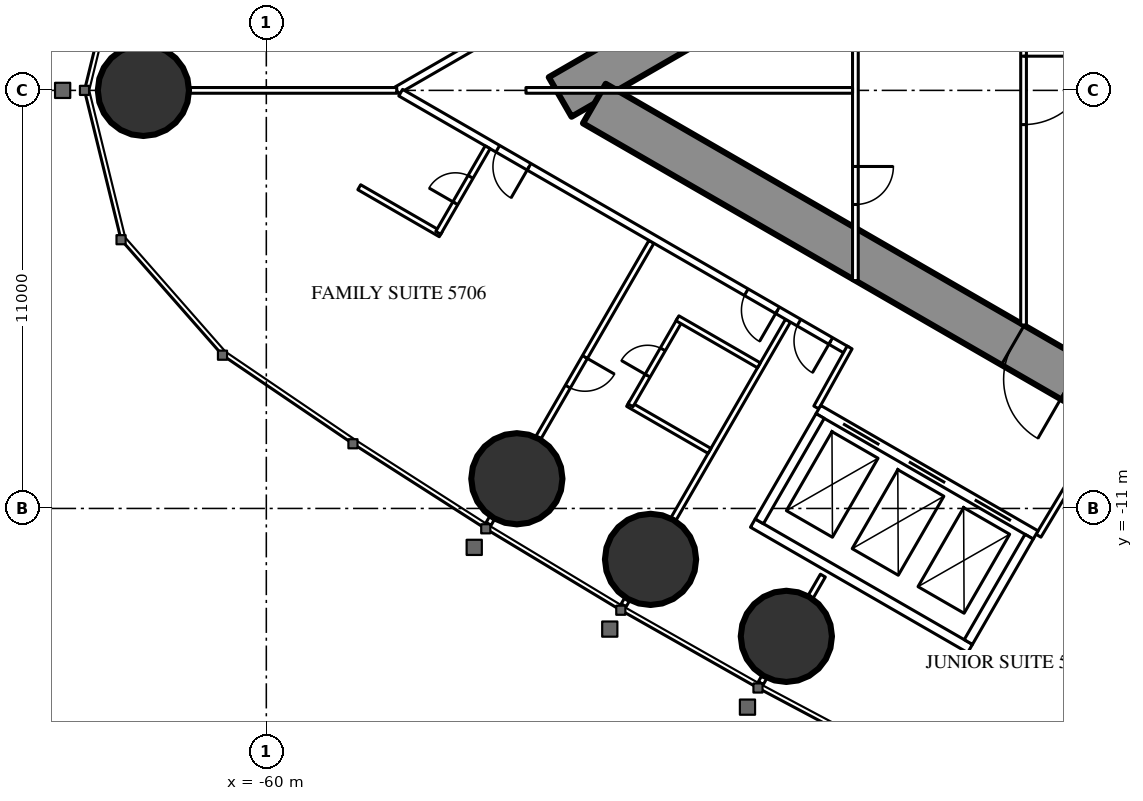
"""IFC4 building model, lengths in metres.
Left out: names, types, materials, properties, quantities, classifications, styles, units other than length and angle.
Written with IfcOpenShell. Run it as: python <this file> out.ifc"""

import sys

from ifc_helpers import new_model, si_unit, direction, frame, frame_2d, origin, origin_2d, place, context, subcontext, project, spatial, rectangle, circle, extrude, element, fill, save


model = new_model("IFC4")
c1 = context("Model", 3, precision=1e-05, world=origin(), true_north=direction((0.0, 1.0)))
c2 = subcontext(c1, "Body", "Model", "MODEL_VIEW")
j1 = project(units=[si_unit("LENGTHUNIT", "METRE"), si_unit("PLANEANGLEUNIT", "RADIAN")], contexts=[c1])
p1 = place(None, origin())
s1 = spatial("IfcSite", under=j1, at=p1, CompositionType="ELEMENT")
p2 = place(p1, origin())
s2 = spatial("IfcBuilding", under=s1, at=p2, CompositionType="ELEMENT")
p3 = place(p2, frame((0.0, 0.0, 215.3)))
s3 = spatial("IfcBuildingStorey", under=s2, at=p3, CompositionType="ELEMENT", Elevation=215.3)
for number, where, z_axis, x_axis in (
    (1, (-63.234, 0.0, 0.0), (0.0, 0.0, 1.0), (1.0, 0.0, 0.0)),
    (2, (-53.408, -10.219, 0.0), (0.0, 0.0, 1.0), (1.0, 0.0, 0.0)),
    (3, (-49.89, -12.34, 0.0), (0.0, 0.0, 1.0), (1.0, 0.0, 0.0)),
    (4, (-46.317, -14.365, 0.0), (0.0, 0.0, 1.0), (1.0, 0.0, 0.0)),
):
    element("IfcColumn", number, at=place(p3, frame(where, z_axis=z_axis, x_axis=x_axis)), inside=s3, PredefinedType="COLUMN", context=c2, shape_type="SweptSolid", body=[
        extrude(circle(Radius=1.2, at=origin_2d()), origin(), (0.0, 0.0, 1.0), 3.6),
    ])
p4 = place(p3, frame((-27.2, 14.3, 0.0), z_axis=(0.0, 0.0, 1.0), x_axis=(-0.866026593062, -0.499997940104, 0.0)))
e5 = element("IfcWall", 5, at=p4, inside=s3, PredefinedType="SHEAR", context=c2, shape_type="SweptSolid", body=[
    extrude(rectangle(XDim=28.946, YDim=1.2, at=frame_2d((14.473, 0.0))), origin(), (0.0, 0.0, 1.0), 3.6),
])
p5 = place(p4, frame((4.6, 0.0, 0.0)))
e6 = element("IfcOpeningElement", 6, at=p5, cuts=e5, PredefinedType="OPENING", context=c2, shape_type="SweptSolid", body=[
    extrude(rectangle(XDim=1.0, YDim=2.2, at=frame_2d((0.5, 1.1))), frame((0.0, 0.61, 0.0), z_axis=(0.0, -1.0, 0.0), x_axis=(1.0, 0.0, 0.0)), (0.0, 0.0, 1.0), 1.22),
])
p6 = place(p4, frame((13.395, 0.0, 0.0)))
e7 = element("IfcOpeningElement", 7, at=p6, cuts=e5, PredefinedType="OPENING", context=c2, shape_type="SweptSolid", body=[
    extrude(rectangle(XDim=1.8, YDim=2.2, at=frame_2d((0.9, 1.1))), frame((0.0, 0.61, 0.0), z_axis=(0.0, -1.0, 0.0), x_axis=(1.0, 0.0, 0.0)), (0.0, 0.0, 1.0), 1.22),
])
p7 = place(p3, frame((-27.2, -14.3, 0.0), z_axis=(0.0, 0.0, 1.0), x_axis=(-0.866024021859, 0.500002393557, 0.0)))
e8 = element("IfcWall", 8, at=p7, inside=s3, PredefinedType="SHEAR", context=c2, shape_type="SweptSolid", body=[
    extrude(rectangle(XDim=27.907, YDim=1.2, at=frame_2d((13.954, 0.0))), origin(), (0.0, 0.0, 1.0), 3.6),
])
p8 = place(p7, frame((4.6, 0.0, 0.0)))
e9 = element("IfcOpeningElement", 9, at=p8, cuts=e8, PredefinedType="OPENING", context=c2, shape_type="SweptSolid", body=[
    extrude(rectangle(XDim=1.0, YDim=2.2, at=frame_2d((0.5, 1.1))), frame((0.0, 0.61, 0.0), z_axis=(0.0, -1.0, 0.0), x_axis=(1.0, 0.0, 0.0)), (0.0, 0.0, 1.0), 1.22),
])
p9 = place(p7, frame((13.395, 0.0, 0.0)))
e10 = element("IfcOpeningElement", 10, at=p9, cuts=e8, PredefinedType="OPENING", context=c2, shape_type="SweptSolid", body=[
    extrude(rectangle(XDim=1.8, YDim=2.2, at=frame_2d((0.9, 1.1))), frame((0.0, 0.61, 0.0), z_axis=(0.0, -1.0, 0.0), x_axis=(1.0, 0.0, 0.0)), (0.0, 0.0, 1.0), 1.22),
])
p10 = place(p3, frame((-28.737, 16.068, 0.0), z_axis=(0.0, 0.0, 1.0), x_axis=(-0.866026057212, -0.499998868229, 0.0)))
e11 = element("IfcWall", 11, at=p10, inside=s3, PredefinedType="PARTITIONING", context=c2, shape_type="SweptSolid", body=[
    extrude(rectangle(XDim=32.137, YDim=0.2, at=frame_2d((16.068, 0.0))), origin(), (0.0, 0.0, 1.0), 3.35),
])
p11 = place(p10, frame((1.08, 0.0, 0.0)))
e12 = element("IfcOpeningElement", 12, at=p11, cuts=e11, PredefinedType="OPENING", context=c2, shape_type="SweptSolid", body=[
    extrude(rectangle(XDim=1.8, YDim=2.03, at=frame_2d((0.9, 1.015))), frame((0.0, 0.11, 0.0), z_axis=(0.0, -1.0, 0.0), x_axis=(1.0, 0.0, 0.0)), (0.0, 0.0, 1.0), 0.22),
])
p12 = place(p10, frame((6.86, 0.0, 0.0)))
e13 = element("IfcOpeningElement", 13, at=p12, cuts=e11, PredefinedType="OPENING", context=c2, shape_type="SweptSolid", body=[
    extrude(rectangle(XDim=1.0, YDim=2.2, at=frame_2d((0.5, 1.1))), frame((0.0, 0.11, 0.0), z_axis=(0.0, -1.0, 0.0), x_axis=(1.0, 0.0, 0.0)), (0.0, 0.0, 1.0), 0.22),
])
p13 = place(p10, frame((16.418, 0.0, 0.0)))
e14 = element("IfcOpeningElement", 14, at=p13, cuts=e11, PredefinedType="OPENING", context=c2, shape_type="SweptSolid", body=[
    extrude(rectangle(XDim=0.95, YDim=2.2, at=frame_2d((0.475, 1.1))), frame((0.0, 0.11, 0.0), z_axis=(0.0, -1.0, 0.0), x_axis=(1.0, 0.0, 0.0)), (0.0, 0.0, 1.0), 0.22),
])
p14 = place(p10, frame((20.567, 0.0, 0.0)))
e15 = element("IfcOpeningElement", 15, at=p14, cuts=e11, PredefinedType="OPENING", context=c2, shape_type="SweptSolid", body=[
    extrude(rectangle(XDim=0.95, YDim=2.2, at=frame_2d((0.475, 1.1))), frame((0.0, 0.11, 0.0), z_axis=(0.0, -1.0, 0.0), x_axis=(1.0, 0.0, 0.0)), (0.0, 0.0, 1.0), 0.22),
])
p15 = place(p10, frame((27.065, 0.0, 0.0)))
e16 = element("IfcOpeningElement", 16, at=p15, cuts=e11, PredefinedType="OPENING", context=c2, shape_type="SweptSolid", body=[
    extrude(rectangle(XDim=0.95, YDim=2.2, at=frame_2d((0.475, 1.1))), frame((0.0, 0.11, 0.0), z_axis=(0.0, -1.0, 0.0), x_axis=(1.0, 0.0, 0.0)), (0.0, 0.0, 1.0), 0.22),
])
p16 = place(p3, frame((-46.898, -15.439, 0.0), z_axis=(0.0, 0.0, 1.0), x_axis=(-0.500232303069, -0.865891241997, 0.0)))
e17 = element("IfcWall", 17, at=p16, inside=s3, PredefinedType="PARTITIONING", context=c2, shape_type="SweptSolid", body=[
    extrude(rectangle(XDim=0.18, YDim=0.15, at=frame_2d((0.09, 0.0))), origin(), (0.0, 0.0, 1.0), 2.45),
])
p17 = place(p3, frame((-46.274, -6.059, 0.0), z_axis=(0.0, 0.0, 1.0), x_axis=(-0.500020471368, -0.866013584312, 0.0)))
e18 = element("IfcWall", 18, at=p17, inside=s3, PredefinedType="PARTITIONING", context=c2, shape_type="SweptSolid", body=[
    extrude(rectangle(XDim=6.028, YDim=0.15, at=frame_2d((3.014, 0.0))), origin(), (0.0, 0.0, 1.0), 2.45),
])
p18 = place(p3, frame((-50.508, -13.392, 0.0), z_axis=(0.0, 0.0, 1.0), x_axis=(-0.499644091975, -0.866230789891, 0.0)))
e19 = element("IfcWall", 19, at=p18, inside=s3, PredefinedType="PARTITIONING", context=c2, shape_type="SweptSolid", body=[
    extrude(rectangle(XDim=0.18, YDim=0.15, at=frame_2d((0.09, 0.0))), origin(), (0.0, 0.0, 1.0), 2.45),
])
p19 = place(p3, frame((-49.866, -3.985, 0.0), z_axis=(0.0, 0.0, 1.0), x_axis=(-0.500000694566, -0.866025002776, 0.0)))
e20 = element("IfcWall", 20, at=p19, inside=s3, PredefinedType="PARTITIONING", context=c2, shape_type="SweptSolid", body=[
    extrude(rectangle(XDim=5.95, YDim=0.15, at=frame_2d((2.975, 0.0))), origin(), (0.0, 0.0, 1.0), 2.45),
])
p20 = place(p19, frame((3.5, 0.0, 0.0)))
e21 = element("IfcOpeningElement", 21, at=p20, cuts=e20, PredefinedType="OPENING", context=c2, shape_type="SweptSolid", body=[
    extrude(rectangle(XDim=0.9, YDim=2.2, at=frame_2d((0.45, 1.1))), frame((0.0, 0.085, 0.0), z_axis=(0.0, -1.0, 0.0), x_axis=(1.0, 0.0, 0.0)), (0.0, 0.0, 1.0), 0.17),
])
p21 = place(p3, frame((-54.061, -11.25, 0.0), z_axis=(0.0, 0.0, 1.0), x_axis=(-0.500391173478, -0.865799441849, 0.0)))
e22 = element("IfcWall", 22, at=p21, inside=s3, PredefinedType="PARTITIONING", context=c2, shape_type="SweptSolid", body=[
    extrude(rectangle(XDim=0.179, YDim=0.15, at=frame_2d((0.089, 0.0))), origin(), (0.0, 0.0, 1.0), 2.45),
])
p22 = place(p3, frame((-56.568, 0.0, 0.0), z_axis=(0.0, 0.0, 1.0), x_axis=(-1.0, 0.0, 0.0)))
e23 = element("IfcWall", 23, at=p22, inside=s3, PredefinedType="PARTITIONING", context=c2, shape_type="SweptSolid", body=[
    extrude(rectangle(XDim=5.446, YDim=0.15, at=frame_2d((2.723, 0.0))), origin(), (0.0, 0.0, 1.0), 2.45),
])
p23 = place(p3, frame((-45.356, -12.767, 0.0), z_axis=(0.0, 0.0, 1.0), x_axis=(-0.499886366516, -0.866091000168, 0.0)))
e24 = element("IfcWall", 24, at=p23, inside=s3, PredefinedType="PARTITIONING", context=c2, shape_type="SweptSolid", body=[
    extrude(rectangle(XDim=0.645, YDim=0.15, at=frame_2d((0.322, 0.0))), origin(), (0.0, 0.0, 1.0), 3.35),
])
p24 = place(p3, frame((-44.715, -6.844, 0.0), z_axis=(0.0, 0.0, 1.0), x_axis=(-0.866025261224, 0.500000246922, 0.0)))
e25 = element("IfcWall", 25, at=p24, inside=s3, PredefinedType="PARTITIONING", context=c2, shape_type="SweptSolid", body=[
    extrude(rectangle(XDim=13.567, YDim=0.2, at=frame_2d((6.783, 0.0))), origin(), (0.0, 0.0, 1.0), 3.35),
])
p25 = place(p24, frame((9.667, 0.0, 0.0)))
e26 = element("IfcOpeningElement", 26, at=p25, cuts=e25, PredefinedType="OPENING", context=c2, shape_type="SweptSolid", body=[
    extrude(rectangle(XDim=0.95, YDim=2.2, at=frame_2d((0.475, 1.1))), frame((0.0, 0.11, 0.0), z_axis=(0.0, -1.0, 0.0), x_axis=(1.0, 0.0, 0.0)), (0.0, 0.0, 1.0), 0.22),
])
p26 = place(p24, frame((2.117, 0.0, 0.0)))
e27 = element("IfcOpeningElement", 27, at=p26, cuts=e25, PredefinedType="OPENING", context=c2, shape_type="SweptSolid", body=[
    extrude(rectangle(XDim=0.95, YDim=2.2, at=frame_2d((0.475, 1.1))), frame((0.0, 0.11, 0.0), z_axis=(0.0, -1.0, 0.0), x_axis=(1.0, 0.0, 0.0)), (0.0, 0.0, 1.0), 0.22),
])
p27 = place(p24, frame((0.5, 0.0, 0.0)))
e28 = element("IfcOpeningElement", 28, at=p27, cuts=e25, PredefinedType="OPENING", context=c2, shape_type="SweptSolid", body=[
    extrude(rectangle(XDim=0.967, YDim=2.2, at=frame_2d((0.483, 1.1))), frame((0.0, 0.11, 0.0), z_axis=(0.0, -1.0, 0.0), x_axis=(1.0, 0.0, 0.0)), (0.0, 0.0, 1.0), 0.22),
])
for number, where, z_axis, x_axis in (
    (29, (-39.683, -11.718, 0.0), (0.0, 0.0, 1.0), (0.514, 0.858, 0.0)),
    (30, (-44.652, -6.764, 0.0), (0.0, 0.0, 1.0), (-0.485, -0.874, 0.0)),
):
    element("IfcWall", number, at=place(p3, frame(where, z_axis=z_axis, x_axis=x_axis)), inside=s3, PredefinedType="PARTITIONING", context=c2, shape_type="SweptSolid", body=[
        extrude(rectangle(XDim=1.805, YDim=0.15, at=frame_2d((0.903, 0.0))), origin(), (0.0, 0.0, 1.0), 3.35),
    ])
p28 = place(p3, frame((-55.411, -3.786, 0.0), z_axis=(0.0, 0.0, 1.0), x_axis=(-0.866006523861, 0.500032699561, 0.0)))
e31 = element("IfcWall", 31, at=p28, inside=s3, PredefinedType="PARTITIONING", context=c2, shape_type="SweptSolid", body=[
    extrude(rectangle(XDim=2.475, YDim=0.15, at=frame_2d((1.237, 0.0))), origin(), (0.0, 0.0, 1.0), 3.35),
])
p29 = place(p3, frame((-54.176, -1.497, 0.0), z_axis=(0.0, 0.0, 1.0), x_axis=(-0.500006934395, -0.866021400173, 0.0)))
e32 = element("IfcWall", 32, at=p29, inside=s3, PredefinedType="PARTITIONING", context=c2, shape_type="SweptSolid", body=[
    extrude(rectangle(XDim=2.6, YDim=0.15, at=frame_2d((1.3, 0.0))), origin(), (0.0, 0.0, 1.0), 3.35),
])
p30 = place(p29, frame((0.9, 0.0, 0.0)))
e33 = element("IfcOpeningElement", 33, at=p30, cuts=e32, PredefinedType="OPENING", context=c2, shape_type="SweptSolid", body=[
    extrude(rectangle(XDim=0.8, YDim=2.2, at=frame_2d((0.4, 1.1))), frame((0.0, 0.085, 0.0), z_axis=(0.0, -1.0, 0.0), x_axis=(1.0, 0.0, 0.0)), (0.0, 0.0, 1.0), 0.17),
])
p31 = place(p3, frame((-48.339, -9.486, 0.0), z_axis=(0.0, 0.0, 1.0), x_axis=(-0.866006523861, 0.500032699561, 0.0)))
e34 = element("IfcWall", 34, at=p31, inside=s3, PredefinedType="PARTITIONING", context=c2, shape_type="SweptSolid", body=[
    extrude(rectangle(XDim=2.475, YDim=0.15, at=frame_2d((1.237, 0.0))), origin(), (0.0, 0.0, 1.0), 3.35),
])
p32 = place(p3, frame((-49.117, -6.034, 0.0), z_axis=(0.0, 0.0, 1.0), x_axis=(-0.500006934395, -0.866021400173, 0.0)))
e35 = element("IfcWall", 35, at=p32, inside=s3, PredefinedType="PARTITIONING", context=c2, shape_type="SweptSolid", body=[
    extrude(rectangle(XDim=2.6, YDim=0.15, at=frame_2d((1.3, 0.0))), origin(), (0.0, 0.0, 1.0), 3.35),
])
p33 = place(p32, frame((0.9, 0.0, 0.0)))
e36 = element("IfcOpeningElement", 36, at=p33, cuts=e35, PredefinedType="OPENING", context=c2, shape_type="SweptSolid", body=[
    extrude(rectangle(XDim=0.8, YDim=2.2, at=frame_2d((0.4, 1.1))), frame((0.0, 0.085, 0.0), z_axis=(0.0, -1.0, 0.0), x_axis=(1.0, 0.0, 0.0)), (0.0, 0.0, 1.0), 0.17),
])
p34 = place(p3, frame((-47.039, -7.234, 0.0), z_axis=(0.0, 0.0, 1.0), x_axis=(-0.866073894602, 0.499916002032, 0.0)))
e37 = element("IfcWall", 37, at=p34, inside=s3, PredefinedType="PARTITIONING", context=c2, shape_type="SweptSolid", body=[
    extrude(rectangle(XDim=2.475, YDim=0.15, at=frame_2d((1.238, 0.0))), origin(), (0.0, 0.0, 1.0), 2.5),
])
p35 = place(p3, frame((-40.075, 6.174, 0.0), z_axis=(0.0, 0.0, 1.0), x_axis=(0.0, -1.0, 0.0)))
e38 = element("IfcWall", 38, at=p35, inside=s3, PredefinedType="PARTITIONING", context=c2, shape_type="SweptSolid", body=[
    extrude(rectangle(XDim=12.348, YDim=0.15, at=frame_2d((6.174, 0.0))), origin(), (0.0, 0.0, 1.0), 3.35),
])
p36 = place(p35, frame((5.274, 0.0, 0.0)))
e39 = element("IfcOpeningElement", 39, at=p36, cuts=e38, PredefinedType="OPENING", context=c2, shape_type="SweptSolid", body=[
    extrude(rectangle(XDim=1.8, YDim=2.2, at=frame_2d((0.9, 1.1))), frame((0.0, 0.085, 0.0), z_axis=(0.0, -1.0, 0.0), x_axis=(1.0, 0.0, 0.0)), (0.0, 0.0, 1.0), 0.17),
])
p37 = place(p3, frame((-44.5, 5.005, 0.0), z_axis=(0.0, 0.0, 1.0), x_axis=(0.0, -1.0, 0.0)))
e40 = element("IfcWall", 40, at=p37, inside=s3, PredefinedType="PARTITIONING", context=c2, shape_type="SweptSolid", body=[
    extrude(rectangle(XDim=10.009, YDim=0.15, at=frame_2d((5.005, 0.0))), origin(), (0.0, 0.0, 1.0), 2.5),
])
p38 = place(p37, frame((2.002, 0.0, 0.0)))
e41 = element("IfcOpeningElement", 41, at=p38, cuts=e40, PredefinedType="OPENING", context=c2, shape_type="SweptSolid", body=[
    extrude(rectangle(XDim=1.0, YDim=2.2, at=frame_2d((0.5, 1.1))), frame((0.0, 0.085, 0.0), z_axis=(0.0, -1.0, 0.0), x_axis=(1.0, 0.0, 0.0)), (0.0, 0.0, 1.0), 0.17),
])
p39 = place(p37, frame((7.007, 0.0, 0.0)))
e42 = element("IfcOpeningElement", 42, at=p39, cuts=e40, PredefinedType="OPENING", context=c2, shape_type="SweptSolid", body=[
    extrude(rectangle(XDim=1.0, YDim=2.2, at=frame_2d((0.5, 1.1))), frame((0.0, 0.085, 0.0), z_axis=(0.0, -1.0, 0.0), x_axis=(1.0, 0.0, 0.0)), (0.0, 0.0, 1.0), 0.17),
])
p40 = place(p3, frame((-44.575, 0.0, 0.0), z_axis=(0.0, 0.0, 1.0), x_axis=(-1.0, 0.0, 0.0)))
e43 = element("IfcWall", 43, at=p40, inside=s3, PredefinedType="PARTITIONING", context=c2, shape_type="SweptSolid", body=[
    extrude(rectangle(XDim=8.593, YDim=0.15, at=frame_2d((4.297, 0.0))), origin(), (0.0, 0.0, 1.0), 2.45),
])
p41 = place(p3, frame((-39.758, -11.697, 0.0), z_axis=(0.0, 0.0, 1.0), x_axis=(-0.866024194504, 0.500002094529, 0.0)))
e44 = element("IfcWall", 44, at=p41, inside=s3, PredefinedType="PARTITIONING", context=c2, shape_type="SweptSolid", body=[
    extrude(rectangle(XDim=6.6, YDim=0.25, at=frame_2d((3.3, 0.0))), origin(), (0.0, 0.0, 1.0), 3.35),
])
p42 = place(p41, frame((0.75, 0.0, 0.0)))
e45 = element("IfcOpeningElement", 45, at=p42, cuts=e44, PredefinedType="OPENING", context=c2, shape_type="SweptSolid", body=[
    extrude(rectangle(XDim=1.1, YDim=2.2, at=frame_2d((0.55, 1.1))), frame((0.0, 0.135, 0.0), z_axis=(0.0, -1.0, 0.0), x_axis=(1.0, 0.0, 0.0)), (0.0, 0.0, 1.0), 0.27),
])
p43 = place(p41, frame((2.75, 0.0, 0.0)))
e46 = element("IfcOpeningElement", 46, at=p43, cuts=e44, PredefinedType="OPENING", context=c2, shape_type="SweptSolid", body=[
    extrude(rectangle(XDim=1.1, YDim=2.2, at=frame_2d((0.55, 1.1))), frame((0.0, 0.135, 0.0), z_axis=(0.0, -1.0, 0.0), x_axis=(1.0, 0.0, 0.0)), (0.0, 0.0, 1.0), 0.27),
])
p44 = place(p41, frame((4.75, 0.0, 0.0)))
e47 = element("IfcOpeningElement", 47, at=p44, cuts=e44, PredefinedType="OPENING", context=c2, shape_type="SweptSolid", body=[
    extrude(rectangle(XDim=1.1, YDim=2.2, at=frame_2d((0.55, 1.1))), frame((0.0, 0.135, 0.0), z_axis=(0.0, -1.0, 0.0), x_axis=(1.0, 0.0, 0.0)), (0.0, 0.0, 1.0), 0.27),
])
p45 = place(p3, frame((-41.482, -14.686, 0.0), z_axis=(0.0, 0.0, 1.0), x_axis=(-0.86603344179, 0.499986077507, 0.0)))
e48 = element("IfcWall", 48, at=p45, inside=s3, PredefinedType="PARTITIONING", context=c2, shape_type="SweptSolid", body=[
    extrude(rectangle(XDim=6.6, YDim=0.25, at=frame_2d((3.3, 0.0))), origin(), (0.0, 0.0, 1.0), 3.35),
])
for number, where, z_axis, x_axis in (
    (49, (-39.928, -11.743, 0.0), (0.0, 0.0, 1.0), (-0.5, -0.866, 0.0)),
    (50, (-45.428, -8.568, 0.0), (0.0, 0.0, 1.0), (-0.5, -0.866, 0.0)),
):
    element("IfcWall", number, at=place(p3, frame(where, z_axis=z_axis, x_axis=x_axis)), inside=s3, PredefinedType="PARTITIONING", context=c2, shape_type="SweptSolid", body=[
        extrude(rectangle(XDim=3.201, YDim=0.25, at=frame_2d((1.6, 0.0))), origin(), (0.0, 0.0, 1.0), 3.35),
    ])
p46 = place(p30, origin())
e51 = element("IfcDoor", 51, at=p46, inside=s3, OperationType="SINGLE_SWING_RIGHT", PredefinedType="DOOR", context=c2, shape_type="SweptSolid", body=[
    extrude(rectangle(XDim=0.8, YDim=2.2, at=frame_2d((0.4, 1.1))), frame((0.0, 0.025, 0.0), z_axis=(0.0, -1.0, 0.0), x_axis=(1.0, 0.0, 0.0)), (0.0, 0.0, 1.0), 0.05),
])
fill(e33, e51)
p47 = place(p25, origin())
e52 = element("IfcDoor", 52, at=p47, inside=s3, OperationType="SINGLE_SWING_LEFT", PredefinedType="DOOR", context=c2, shape_type="SweptSolid", body=[
    extrude(rectangle(XDim=0.95, YDim=2.2, at=frame_2d((0.475, 1.1))), frame((0.0, 0.025, 0.0), z_axis=(0.0, -1.0, 0.0), x_axis=(1.0, 0.0, 0.0)), (0.0, 0.0, 1.0), 0.05),
])
fill(e26, e52)
p48 = place(p33, origin())
e53 = element("IfcDoor", 53, at=p48, inside=s3, OperationType="SINGLE_SWING_RIGHT", PredefinedType="DOOR", context=c2, shape_type="SweptSolid", body=[
    extrude(rectangle(XDim=0.8, YDim=2.2, at=frame_2d((0.4, 1.1))), frame((0.0, 0.025, 0.0), z_axis=(0.0, -1.0, 0.0), x_axis=(1.0, 0.0, 0.0)), (0.0, 0.0, 1.0), 0.05),
])
fill(e36, e53)
p49 = place(p26, origin())
e54 = element("IfcDoor", 54, at=p49, inside=s3, OperationType="SINGLE_SWING_LEFT", PredefinedType="DOOR", context=c2, shape_type="SweptSolid", body=[
    extrude(rectangle(XDim=0.95, YDim=2.2, at=frame_2d((0.475, 1.1))), frame((0.0, 0.025, 0.0), z_axis=(0.0, -1.0, 0.0), x_axis=(1.0, 0.0, 0.0)), (0.0, 0.0, 1.0), 0.05),
])
fill(e27, e54)
p50 = place(p27, origin())
e55 = element("IfcDoor", 55, at=p50, inside=s3, OperationType="SINGLE_SWING_LEFT", PredefinedType="DOOR", context=c2, shape_type="SweptSolid", body=[
    extrude(rectangle(XDim=0.967, YDim=2.2, at=frame_2d((0.483, 1.1))), frame((0.0, 0.025, 0.0), z_axis=(0.0, -1.0, 0.0), x_axis=(1.0, 0.0, 0.0)), (0.0, 0.0, 1.0), 0.05),
])
fill(e28, e55)
p51 = place(p20, origin())
e56 = element("IfcDoor", 56, at=p51, inside=s3, OperationType="SINGLE_SWING_LEFT", PredefinedType="DOOR", context=c2, shape_type="SweptSolid", body=[
    extrude(rectangle(XDim=0.9, YDim=2.2, at=frame_2d((0.45, 1.1))), frame((0.0, 0.025, 0.0), z_axis=(0.0, -1.0, 0.0), x_axis=(1.0, 0.0, 0.0)), (0.0, 0.0, 1.0), 0.05),
])
fill(e21, e56)
p52 = place(p36, origin())
e57 = element("IfcDoor", 57, at=p52, inside=s3, OperationType="DOUBLE_DOOR_SINGLE_SWING", PredefinedType="DOOR", context=c2, shape_type="SweptSolid", body=[
    extrude(rectangle(XDim=1.8, YDim=2.2, at=frame_2d((0.9, 1.1))), frame((0.0, 0.025, 0.0), z_axis=(0.0, -1.0, 0.0), x_axis=(1.0, 0.0, 0.0)), (0.0, 0.0, 1.0), 0.05),
])
fill(e39, e57)
p53 = place(p39, origin())
e58 = element("IfcDoor", 58, at=p53, inside=s3, OperationType="SINGLE_SWING_LEFT", PredefinedType="DOOR", context=c2, shape_type="SweptSolid", body=[
    extrude(rectangle(XDim=1.0, YDim=2.2, at=frame_2d((0.5, 1.1))), frame((0.0, 0.025, 0.0), z_axis=(0.0, -1.0, 0.0), x_axis=(1.0, 0.0, 0.0)), (0.0, 0.0, 1.0), 0.05),
])
fill(e42, e58)
p54 = place(p9, origin())
e59 = element("IfcDoor", 59, at=p54, inside=s3, OperationType="DOUBLE_DOOR_SINGLE_SWING", PredefinedType="DOOR", context=c2, shape_type="SweptSolid", body=[
    extrude(rectangle(XDim=1.8, YDim=2.2, at=frame_2d((0.9, 1.1))), frame((0.0, 0.025, 0.0), z_axis=(0.0, -1.0, 0.0), x_axis=(1.0, 0.0, 0.0)), (0.0, 0.0, 1.0), 0.05),
])
fill(e10, e59)
p55 = place(p42, origin())
e60 = element("IfcDoor", 60, at=p55, inside=s3, OperationType="DOUBLE_DOOR_SLIDING", PredefinedType="USERDEFINED", context=c2, shape_type="SweptSolid", body=[
    extrude(rectangle(XDim=1.1, YDim=2.2, at=frame_2d((0.55, 1.1))), frame((0.0, 0.025, 0.0), z_axis=(0.0, -1.0, 0.0), x_axis=(1.0, 0.0, 0.0)), (0.0, 0.0, 1.0), 0.05),
])
fill(e45, e60)
p56 = place(p43, origin())
e61 = element("IfcDoor", 61, at=p56, inside=s3, OperationType="DOUBLE_DOOR_SLIDING", PredefinedType="USERDEFINED", context=c2, shape_type="SweptSolid", body=[
    extrude(rectangle(XDim=1.1, YDim=2.2, at=frame_2d((0.55, 1.1))), frame((0.0, 0.025, 0.0), z_axis=(0.0, -1.0, 0.0), x_axis=(1.0, 0.0, 0.0)), (0.0, 0.0, 1.0), 0.05),
])
fill(e46, e61)
p57 = place(p44, origin())
e62 = element("IfcDoor", 62, at=p57, inside=s3, OperationType="DOUBLE_DOOR_SLIDING", PredefinedType="USERDEFINED", context=c2, shape_type="SweptSolid", body=[
    extrude(rectangle(XDim=1.1, YDim=2.2, at=frame_2d((0.55, 1.1))), frame((0.0, 0.025, 0.0), z_axis=(0.0, -1.0, 0.0), x_axis=(1.0, 0.0, 0.0)), (0.0, 0.0, 1.0), 0.05),
])
fill(e47, e62)
save(model, sys.argv[1])
